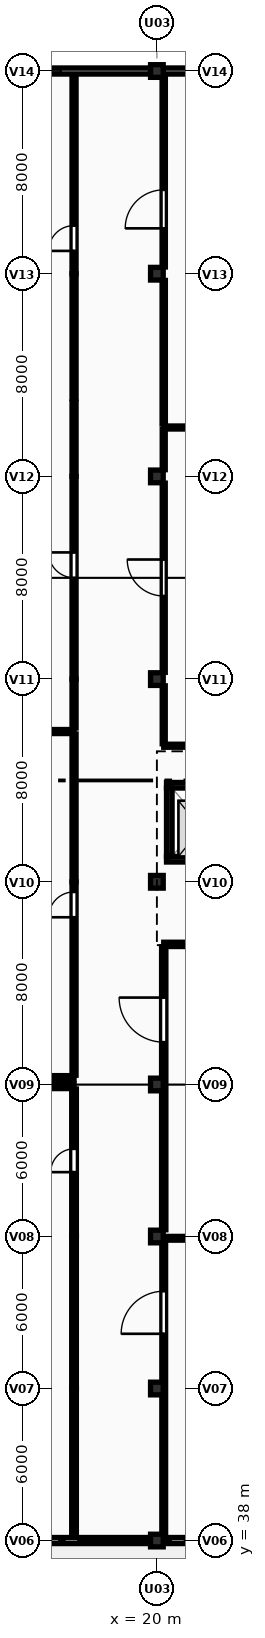
"""IFC4 building model, lengths in metres.
Left out: names, types, materials, properties, quantities, classifications, styles, units other than length and angle.
Written with IfcOpenShell. Run it as: python <this file> out.ifc"""

import sys

from ifc_helpers import new_model, si_unit, direction, frame, frame_2d, origin, origin_2d, place, context, subcontext, project, spatial, rectangle, extrude, element, fill, save


model = new_model("IFC4")
c1 = context("Model", 3, precision=1e-05, world=origin(), true_north=direction((0.0, 1.0)))
c2 = subcontext(c1, "Body", "Model", "MODEL_VIEW")
j1 = project(units=[si_unit("LENGTHUNIT", "METRE"), si_unit("PLANEANGLEUNIT", "RADIAN")], contexts=[c1])
p1 = place(None, origin())
s1 = spatial("IfcSite", under=j1, at=p1, CompositionType="ELEMENT")
p2 = place(p1, origin())
s2 = spatial("IfcBuilding", under=s1, at=p2, CompositionType="ELEMENT")
p3 = place(p2, frame((0.0, 0.0, 4.5)))
s3 = spatial("IfcBuildingStorey", under=s2, at=p3, CompositionType="ELEMENT", Elevation=4.5)
for number, where, z_axis, x_axis in (
    (1, (20.0, 38.0, 0.0), (0.0, 0.0, 1.0), (1.0, 0.0, 0.0)),
    (2, (20.0, 44.0, 0.0), (0.0, 0.0, 1.0), (1.0, 0.0, 0.0)),
    (3, (20.0, 50.0, 0.0), (0.0, 0.0, 1.0), (1.0, 0.0, 0.0)),
    (4, (20.0, 56.0, 0.0), (0.0, 0.0, 1.0), (1.0, 0.0, 0.0)),
    (5, (20.0, 64.0, 0.0), (0.0, 0.0, 1.0), (1.0, 0.0, 0.0)),
    (6, (20.0, 72.0, 0.0), (0.0, 0.0, 1.0), (1.0, 0.0, 0.0)),
    (7, (20.0, 80.0, 0.0), (0.0, 0.0, 1.0), (1.0, 0.0, 0.0)),
    (8, (20.0, 88.0, 0.0), (0.0, 0.0, 1.0), (1.0, 0.0, 0.0)),
    (9, (20.0, 96.0, 0.0), (0.0, 0.0, 1.0), (1.0, 0.0, 0.0)),
):
    element("IfcColumn", number, at=place(p3, frame(where, z_axis=z_axis, x_axis=x_axis)), inside=s3, PredefinedType="COLUMN", context=c2, shape_type="SweptSolid", body=[
        extrude(rectangle(XDim=0.5, YDim=0.5, at=origin_2d()), origin(), (0.0, 0.0, 1.0), 3.9),
    ])
p4 = place(p3, frame((12.25, 96.0, 0.0), z_axis=(0.0, 0.0, 1.0), x_axis=(1.0, 0.0, 0.0)))
e10 = element("IfcWall", 10, at=p4, inside=s3, PredefinedType="SOLIDWALL", context=c2, shape_type="SweptSolid", body=[
    extrude(rectangle(XDim=7.5, YDim=0.24, at=frame_2d((3.75, 0.0))), origin(), (0.0, 0.0, 1.0), 3.0),
])
p5 = place(p4, frame((2.65, 0.0, 0.95)))
e11 = element("IfcOpeningElement", 11, at=p5, cuts=e10, PredefinedType="OPENING", context=c2, shape_type="SweptSolid", body=[
    extrude(rectangle(XDim=1.3, YDim=1.4, at=frame_2d((0.65, 0.7))), frame((0.0, 0.13, 0.0), z_axis=(0.0, -1.0, 0.0), x_axis=(1.0, 0.0, 0.0)), (0.0, 0.0, 1.0), 0.26),
])
p6 = place(p3, frame((20.25, 96.0, 0.0), z_axis=(0.0, 0.0, 1.0), x_axis=(1.0, 0.0, 0.0)))
e12 = element("IfcWall", 12, at=p6, inside=s3, PredefinedType="SOLIDWALL", context=c2, shape_type="SweptSolid", body=[
    extrude(rectangle(XDim=7.5, YDim=0.24, at=frame_2d((3.75, 0.0))), origin(), (0.0, 0.0, 1.0), 3.0),
])
p7 = place(p6, frame((2.975, 0.0, 0.95)))
e13 = element("IfcOpeningElement", 13, at=p7, cuts=e12, PredefinedType="OPENING", context=c2, shape_type="SweptSolid", body=[
    extrude(rectangle(XDim=1.55, YDim=1.4, at=frame_2d((0.775, 0.7))), frame((0.0, 0.13, 0.0), z_axis=(0.0, -1.0, 0.0), x_axis=(1.0, 0.0, 0.0)), (0.0, 0.0, 1.0), 0.26),
])
p8 = place(p3, frame((27.75, 38.0, 0.0), z_axis=(0.0, 0.0, 1.0), x_axis=(-1.0, 0.0, 0.0)))
e14 = element("IfcWall", 14, at=p8, inside=s3, PredefinedType="SOLIDWALL", context=c2, shape_type="SweptSolid", body=[
    extrude(rectangle(XDim=7.5, YDim=0.24, at=frame_2d((3.75, 0.0))), origin(), (0.0, 0.0, 1.0), 2.998),
])
p9 = place(p8, frame((2.85, 0.0, 0.95)))
e15 = element("IfcOpeningElement", 15, at=p9, cuts=e14, PredefinedType="OPENING", context=c2, shape_type="SweptSolid", body=[
    extrude(rectangle(XDim=1.8, YDim=1.5, at=frame_2d((0.9, 0.75))), frame((0.0, 0.13, 0.0), z_axis=(0.0, -1.0, 0.0), x_axis=(1.0, 0.0, 0.0)), (0.0, 0.0, 1.0), 0.26),
])
p10 = place(p3, frame((19.75, 38.0, 0.0), z_axis=(0.0, 0.0, 1.0), x_axis=(-1.0, 0.0, 0.0)))
e16 = element("IfcWall", 16, at=p10, inside=s3, PredefinedType="SOLIDWALL", context=c2, shape_type="SweptSolid", body=[
    extrude(rectangle(XDim=7.5, YDim=0.24, at=frame_2d((3.75, 0.0))), origin(), (0.0, 0.0, 1.0), 2.998),
])
p11 = place(p3, frame((23.12, 64.89, 0.0), z_axis=(0.0, 0.0, 1.0), x_axis=(-1.0, 0.0, 0.0)))
e17 = element("IfcWall", 17, at=p11, inside=s3, PredefinedType="SHEAR", context=c2, shape_type="SweptSolid", body=[
    extrude(rectangle(XDim=2.74, YDim=0.22, at=frame_2d((1.37, 0.0))), origin(), (0.0, 0.0, 1.0), 3.65),
])
p12 = place(p11, frame((0.87, 0.0, 0.0)))
e18 = element("IfcOpeningElement", 18, at=p12, cuts=e17, PredefinedType="OPENING", context=c2, shape_type="SweptSolid", body=[
    extrude(rectangle(XDim=1.0, YDim=2.15, at=frame_2d((0.5, 1.075))), frame((0.0, 0.12, 0.0), z_axis=(0.0, -1.0, 0.0), x_axis=(1.0, 0.0, 0.0)), (0.0, 0.0, 1.0), 0.24),
])
p13 = place(p3, frame((20.38, 67.81, 0.0), z_axis=(0.0, 0.0, 1.0), x_axis=(1.0, 0.0, 0.0)))
e19 = element("IfcWall", 19, at=p13, inside=s3, PredefinedType="SHEAR", context=c2, shape_type="SweptSolid", body=[
    extrude(rectangle(XDim=2.74, YDim=0.22, at=frame_2d((1.37, 0.0))), origin(), (0.0, 0.0, 1.0), 3.65),
])
p14 = place(p3, frame((20.49, 65.0, 0.0), z_axis=(0.0, 0.0, 1.0), x_axis=(0.0, 1.0, 0.0)))
e20 = element("IfcWall", 20, at=p14, inside=s3, PredefinedType="SHEAR", context=c2, shape_type="SweptSolid", body=[
    extrude(rectangle(XDim=2.7, YDim=0.22, at=frame_2d((1.35, 0.0))), origin(), (0.0, 0.0, 1.0), 3.65),
])
p15 = place(p3, frame((12.265, 56.27, 0.0), z_axis=(0.0, 0.0, 1.0), x_axis=(1.0, 0.0, 0.0)))
e21 = element("IfcWall", 21, at=p15, inside=s3, PredefinedType="PARTITIONING", context=c2, shape_type="SweptSolid", body=[
    extrude(rectangle(XDim=4.465, YDim=0.16, at=frame_2d((2.232, 0.0))), origin(), (0.0, 0.0, 1.0), 3.0),
])
p16 = place(p3, frame((12.0, 69.93, 0.0), z_axis=(0.0, 0.0, 1.0), x_axis=(1.0, 0.0, 0.0)))
e22 = element("IfcWall", 22, at=p16, inside=s3, PredefinedType="PARTITIONING", context=c2, shape_type="SweptSolid", body=[
    extrude(rectangle(XDim=4.73, YDim=0.16, at=frame_2d((2.365, 0.0))), origin(), (0.0, 0.0, 1.0), 3.65),
])
p17 = place(p3, frame((16.73, 56.365, 0.0), z_axis=(0.0, 0.0, 1.0), x_axis=(0.0, 1.0, 0.0)))
e23 = element("IfcWall", 23, at=p17, inside=s3, PredefinedType="PARTITIONING", context=c2, shape_type="SweptSolid", body=[
    extrude(rectangle(XDim=7.635, YDim=0.16, at=frame_2d((3.817, 0.0))), origin(), (0.0, 0.0, 1.0), 3.65),
])
p18 = place(p17, frame((6.235, 0.0, 0.0)))
e24 = element("IfcOpeningElement", 24, at=p18, cuts=e23, PredefinedType="OPENING", context=c2, shape_type="SweptSolid", body=[
    extrude(rectangle(XDim=1.0, YDim=2.15, at=frame_2d((0.5, 1.075))), frame((0.0, 0.09, 0.0), z_axis=(0.0, -1.0, 0.0), x_axis=(1.0, 0.0, 0.0)), (0.0, 0.0, 1.0), 0.18),
])
p19 = place(p3, frame((16.73, 64.0, 0.0), z_axis=(0.0, 0.0, 1.0), x_axis=(0.0, 1.0, 0.0)))
e25 = element("IfcWall", 25, at=p19, inside=s3, PredefinedType="PARTITIONING", context=c2, shape_type="SweptSolid", body=[
    extrude(rectangle(XDim=5.835, YDim=0.16, at=frame_2d((2.917, 0.0))), origin(), (0.0, 0.0, 1.0), 3.65),
])
p20 = place(p3, frame((16.73, 70.07, 0.0), z_axis=(0.0, 0.0, 1.0), x_axis=(0.0, 1.0, 0.0)))
e26 = element("IfcWall", 26, at=p20, inside=s3, PredefinedType="PARTITIONING", context=c2, shape_type="SweptSolid", body=[
    extrude(rectangle(XDim=1.93, YDim=0.16, at=frame_2d((0.965, 0.0))), origin(), (0.0, 0.0, 1.0), 3.65),
])
p21 = place(p3, frame((16.73, 72.0, 0.0), z_axis=(0.0, 0.0, 1.0), x_axis=(0.0, 1.0, 0.0)))
e27 = element("IfcWall", 27, at=p21, inside=s3, PredefinedType="PARTITIONING", context=c2, shape_type="SweptSolid", body=[
    extrude(rectangle(XDim=8.0, YDim=0.16, at=frame_2d((4.0, 0.0))), origin(), (0.0, 0.0, 1.0), 3.65),
])
p22 = place(p21, frame((4.0, 0.0, 0.0)))
e28 = element("IfcOpeningElement", 28, at=p22, cuts=e27, PredefinedType="OPENING", context=c2, shape_type="SweptSolid", body=[
    extrude(rectangle(XDim=1.0, YDim=2.15, at=frame_2d((0.5, 1.075))), frame((0.0, 0.09, 0.0), z_axis=(0.0, -1.0, 0.0), x_axis=(1.0, 0.0, 0.0)), (0.0, 0.0, 1.0), 0.18),
])
p23 = place(p3, frame((16.73, 80.0, 0.0), z_axis=(0.0, 0.0, 1.0), x_axis=(0.0, 1.0, 0.0)))
e29 = element("IfcWall", 29, at=p23, inside=s3, PredefinedType="PARTITIONING", context=c2, shape_type="SweptSolid", body=[
    extrude(rectangle(XDim=2.93, YDim=0.16, at=frame_2d((1.465, 0.0))), origin(), (0.0, 0.0, 1.0), 3.65),
])
p24 = place(p3, frame((16.73, 83.07, 0.0), z_axis=(0.0, 0.0, 1.0), x_axis=(0.0, 1.0, 0.0)))
e30 = element("IfcWall", 30, at=p24, inside=s3, PredefinedType="PARTITIONING", context=c2, shape_type="SweptSolid", body=[
    extrude(rectangle(XDim=4.93, YDim=0.16, at=frame_2d((2.465, 0.0))), origin(), (0.0, 0.0, 1.0), 3.65),
])
p25 = place(p3, frame((16.73, 88.0, 0.0), z_axis=(0.0, 0.0, 1.0), x_axis=(0.0, 1.0, 0.0)))
e31 = element("IfcWall", 31, at=p25, inside=s3, PredefinedType="PARTITIONING", context=c2, shape_type="SweptSolid", body=[
    extrude(rectangle(XDim=7.838, YDim=0.16, at=frame_2d((3.919, 0.0))), origin(), (0.0, 0.0, 1.0), 3.65),
])
p26 = place(p25, frame((0.9, 0.0, 0.0)))
e32 = element("IfcOpeningElement", 32, at=p26, cuts=e31, PredefinedType="OPENING", context=c2, shape_type="SweptSolid", body=[
    extrude(rectangle(XDim=1.0, YDim=2.15, at=frame_2d((0.5, 1.075))), frame((0.0, 0.09, 0.0), z_axis=(0.0, -1.0, 0.0), x_axis=(1.0, 0.0, 0.0)), (0.0, 0.0, 1.0), 0.18),
])
for number, where, z_axis, x_axis in (
    (33, (20.27, 69.37, 0.0), (0.0, 0.0, 1.0), (1.0, 0.0, 0.0)),
    (34, (20.27, 81.93, 0.0), (0.0, 0.0, 1.0), (1.0, 0.0, 0.0)),
):
    element("IfcWall", number, at=place(p3, frame(where, z_axis=z_axis, x_axis=x_axis)), inside=s3, PredefinedType="PARTITIONING", context=c2, shape_type="SweptSolid", body=[
        extrude(rectangle(XDim=7.73, YDim=0.12, at=frame_2d((3.865, 0.0))), origin(), (0.0, 0.0, 1.0), 3.65),
    ])
p27 = place(p3, frame((20.27, 69.445, 0.0), z_axis=(0.0, 0.0, 1.0), x_axis=(0.0, 1.0, 0.0)))
e35 = element("IfcWall", 35, at=p27, inside=s3, PredefinedType="PARTITIONING", context=c2, shape_type="SweptSolid", body=[
    extrude(rectangle(XDim=2.29, YDim=0.12, at=frame_2d((1.145, 0.0))), origin(), (0.0, 0.0, 1.0), 3.0),
])
p28 = place(p3, frame((20.27, 72.265, 0.0), z_axis=(0.0, 0.0, 1.0), x_axis=(0.0, 1.0, 0.0)))
e36 = element("IfcWall", 36, at=p28, inside=s3, PredefinedType="PARTITIONING", context=c2, shape_type="SweptSolid", body=[
    extrude(rectangle(XDim=7.47, YDim=0.12, at=frame_2d((3.735, 0.0))), origin(), (0.0, 0.0, 1.0), 3.0),
])
p29 = place(p28, frame((3.015, 0.0, 0.0)))
e37 = element("IfcOpeningElement", 37, at=p29, cuts=e36, PredefinedType="OPENING", context=c2, shape_type="SweptSolid", body=[
    extrude(rectangle(XDim=1.44, YDim=2.15, at=frame_2d((0.72, 1.075))), frame((0.0, 0.07, 0.0), z_axis=(0.0, -1.0, 0.0), x_axis=(1.0, 0.0, 0.0)), (0.0, 0.0, 1.0), 0.14),
])
p30 = place(p3, frame((20.27, 80.265, 0.0), z_axis=(0.0, 0.0, 1.0), x_axis=(0.0, 1.0, 0.0)))
e38 = element("IfcWall", 38, at=p30, inside=s3, PredefinedType="PARTITIONING", context=c2, shape_type="SweptSolid", body=[
    extrude(rectangle(XDim=1.59, YDim=0.12, at=frame_2d((0.795, 0.0))), origin(), (0.0, 0.0, 1.0), 3.0),
])
p31 = place(p3, frame((20.27, 82.07, 0.0), z_axis=(0.0, 0.0, 1.0), x_axis=(0.0, 1.0, 0.0)))
e39 = element("IfcWall", 39, at=p31, inside=s3, PredefinedType="PARTITIONING", context=c2, shape_type="SweptSolid", body=[
    extrude(rectangle(XDim=5.665, YDim=0.13, at=frame_2d((2.833, 0.0))), origin(), (0.0, 0.0, 1.0), 3.0),
])
p32 = place(p3, frame((20.27, 88.265, 0.0), z_axis=(0.0, 0.0, 1.0), x_axis=(0.0, 1.0, 0.0)))
e40 = element("IfcWall", 40, at=p32, inside=s3, PredefinedType="PARTITIONING", context=c2, shape_type="SweptSolid", body=[
    extrude(rectangle(XDim=7.47, YDim=0.13, at=frame_2d((3.735, 0.0))), origin(), (0.0, 0.0, 1.0), 3.0),
])
p33 = place(p32, frame((1.525, 0.0, 0.0)))
e41 = element("IfcOpeningElement", 41, at=p33, cuts=e40, PredefinedType="OPENING", context=c2, shape_type="SweptSolid", body=[
    extrude(rectangle(XDim=1.52, YDim=2.2, at=frame_2d((0.76, 1.1))), frame((0.0, 0.075, 0.0), z_axis=(0.0, -1.0, 0.0), x_axis=(1.0, 0.0, 0.0)), (0.0, 0.0, 1.0), 0.15),
])
p34 = place(p3, frame((20.27, 49.93, 0.0), z_axis=(0.0, 0.0, 1.0), x_axis=(1.0, 0.0, 0.0)))
e42 = element("IfcWall", 42, at=p34, inside=s3, PredefinedType="PARTITIONING", context=c2, shape_type="SweptSolid", body=[
    extrude(rectangle(XDim=7.465, YDim=0.15, at=frame_2d((3.732, 0.0))), origin(), (0.0, 0.0, 1.0), 3.0),
])
p35 = place(p3, frame((20.27, 38.265, 0.0), z_axis=(0.0, 0.0, 1.0), x_axis=(0.0, 1.0, 0.0)))
e43 = element("IfcWall", 43, at=p35, inside=s3, PredefinedType="PARTITIONING", context=c2, shape_type="SweptSolid", body=[
    extrude(rectangle(XDim=11.47, YDim=0.15, at=frame_2d((5.735, 0.0))), origin(), (0.0, 0.0, 1.0), 2.998),
])
p36 = place(p35, frame((7.895, 0.0, 0.0)))
e44 = element("IfcOpeningElement", 44, at=p36, cuts=e43, PredefinedType="OPENING", context=c2, shape_type="SweptSolid", body=[
    extrude(rectangle(XDim=1.68, YDim=2.2, at=frame_2d((0.84, 1.1))), frame((0.0, 0.085, 0.0), z_axis=(0.0, -1.0, 0.0), x_axis=(1.0, 0.0, 0.0)), (0.0, 0.0, 1.0), 0.17),
])
p37 = place(p3, frame((20.27, 61.53, 0.0), z_axis=(0.0, 0.0, 1.0), x_axis=(1.0, 0.0, 0.0)))
e45 = element("IfcWall", 45, at=p37, inside=s3, PredefinedType="PARTITIONING", context=c2, shape_type="SweptSolid", body=[
    extrude(rectangle(XDim=7.73, YDim=0.17, at=frame_2d((3.865, 0.0))), origin(), (0.0, 0.0, 1.0), 3.65),
])
p38 = place(p3, frame((20.27, 50.265, 0.0), z_axis=(0.0, 0.0, 1.0), x_axis=(0.0, 1.0, 0.0)))
e46 = element("IfcWall", 46, at=p38, inside=s3, PredefinedType="PARTITIONING", context=c2, shape_type="SweptSolid", body=[
    extrude(rectangle(XDim=11.165, YDim=0.17, at=frame_2d((5.583, 0.0))), origin(), (0.0, 0.0, 1.0), 3.0),
])
p39 = place(p38, frame((7.405, 0.0, 0.0)))
e47 = element("IfcOpeningElement", 47, at=p39, cuts=e46, PredefinedType="OPENING", context=c2, shape_type="SweptSolid", body=[
    extrude(rectangle(XDim=1.76, YDim=2.2, at=frame_2d((0.88, 1.1))), frame((0.0, 0.095, 0.0), z_axis=(0.0, -1.0, 0.0), x_axis=(1.0, 0.0, 0.0)), (0.0, 0.0, 1.0), 0.19),
])
p40 = place(p3, frame((11.005, 55.93, 0.0), z_axis=(0.0, 0.0, 1.0), x_axis=(1.0, 0.0, 0.0)))
e48 = element("IfcWall", 48, at=p40, inside=s3, PredefinedType="PARTITIONING", context=c2, shape_type="SweptSolid", body=[
    extrude(rectangle(XDim=5.725, YDim=0.185, at=frame_2d((2.863, 0.0))), origin(), (0.0, 0.0, 1.0), 3.0),
])
p41 = place(p3, frame((16.73, 38.162, 0.0), z_axis=(0.0, 0.0, 1.0), x_axis=(0.0, 1.0, 0.0)))
e49 = element("IfcWall", 49, at=p41, inside=s3, PredefinedType="PARTITIONING", context=c2, shape_type="SweptSolid", body=[
    extrude(rectangle(XDim=5.838, YDim=0.185, at=frame_2d((2.919, 0.0))), origin(), (0.0, 0.0, 1.0), 3.65),
])
p42 = place(p3, frame((16.73, 44.0, 0.0), z_axis=(0.0, 0.0, 1.0), x_axis=(0.0, 1.0, 0.0)))
e50 = element("IfcWall", 50, at=p42, inside=s3, PredefinedType="PARTITIONING", context=c2, shape_type="SweptSolid", body=[
    extrude(rectangle(XDim=6.0, YDim=0.185, at=frame_2d((3.0, 0.0))), origin(), (0.0, 0.0, 1.0), 3.65),
])
p43 = place(p3, frame((16.73, 50.0, 0.0), z_axis=(0.0, 0.0, 1.0), x_axis=(0.0, 1.0, 0.0)))
e51 = element("IfcWall", 51, at=p43, inside=s3, PredefinedType="PARTITIONING", context=c2, shape_type="SweptSolid", body=[
    extrude(rectangle(XDim=5.823, YDim=0.185, at=frame_2d((2.911, 0.0))), origin(), (0.0, 0.0, 1.0), 3.65),
])
p44 = place(p43, frame((2.54, 0.0, 0.0)))
e52 = element("IfcOpeningElement", 52, at=p44, cuts=e51, PredefinedType="OPENING", context=c2, shape_type="SweptSolid", body=[
    extrude(rectangle(XDim=0.92, YDim=2.2, at=frame_2d((0.46, 1.1))), frame((0.0, 0.103, 0.0), z_axis=(0.0, -1.0, 0.0), x_axis=(1.0, 0.0, 0.0)), (0.0, 0.0, 1.0), 0.205),
])
p45 = place(p5, origin())
e53 = element("IfcWindow", 53, at=p45, inside=s3, PartitioningType="SINGLE_PANEL", PredefinedType="WINDOW", context=c2, shape_type="SweptSolid", body=[
    extrude(rectangle(XDim=1.3, YDim=1.4, at=frame_2d((0.65, 0.7))), frame((0.0, 0.03, 0.0), z_axis=(0.0, -1.0, 0.0), x_axis=(1.0, 0.0, 0.0)), (0.0, 0.0, 1.0), 0.06),
])
fill(e11, e53)
p46 = place(p18, origin())
e54 = element("IfcDoor", 54, at=p46, inside=s3, OperationType="SINGLE_SWING_LEFT", PredefinedType="DOOR", context=c2, shape_type="SweptSolid", body=[
    extrude(rectangle(XDim=1.0, YDim=2.15, at=frame_2d((0.5, 1.075))), frame((0.0, 0.025, 0.0), z_axis=(0.0, -1.0, 0.0), x_axis=(1.0, 0.0, 0.0)), (0.0, 0.0, 1.0), 0.05),
])
fill(e24, e54)
p47 = place(p22, origin())
e55 = element("IfcDoor", 55, at=p47, inside=s3, OperationType="SINGLE_SWING_RIGHT", PredefinedType="DOOR", context=c2, shape_type="SweptSolid", body=[
    extrude(rectangle(XDim=1.0, YDim=2.15, at=frame_2d((0.5, 1.075))), frame((0.0, 0.025, 0.0), z_axis=(0.0, -1.0, 0.0), x_axis=(1.0, 0.0, 0.0)), (0.0, 0.0, 1.0), 0.05),
])
fill(e28, e55)
p48 = place(p26, origin())
e56 = element("IfcDoor", 56, at=p48, inside=s3, OperationType="SINGLE_SWING_LEFT", PredefinedType="DOOR", context=c2, shape_type="SweptSolid", body=[
    extrude(rectangle(XDim=1.0, YDim=2.15, at=frame_2d((0.5, 1.075))), frame((0.0, 0.025, 0.0), z_axis=(0.0, -1.0, 0.0), x_axis=(1.0, 0.0, 0.0)), (0.0, 0.0, 1.0), 0.05),
])
fill(e32, e56)
p49 = place(p29, origin())
e57 = element("IfcDoor", 57, at=p49, inside=s3, OperationType="SINGLE_SWING_RIGHT", PredefinedType="DOOR", context=c2, shape_type="SweptSolid", body=[
    extrude(rectangle(XDim=1.44, YDim=2.15, at=frame_2d((0.72, 1.075))), frame((0.0, 0.025, 0.0), z_axis=(0.0, -1.0, 0.0), x_axis=(1.0, 0.0, 0.0)), (0.0, 0.0, 1.0), 0.05),
])
fill(e37, e57)
p50 = place(p33, origin())
e58 = element("IfcDoor", 58, at=p50, inside=s3, OperationType="SINGLE_SWING_LEFT", PredefinedType="DOOR", context=c2, shape_type="SweptSolid", body=[
    extrude(rectangle(XDim=1.52, YDim=2.2, at=frame_2d((0.76, 1.1))), frame((0.0, 0.025, 0.0), z_axis=(0.0, -1.0, 0.0), x_axis=(1.0, 0.0, 0.0)), (0.0, 0.0, 1.0), 0.05),
])
fill(e41, e58)
p51 = place(p36, origin())
e59 = element("IfcDoor", 59, at=p51, inside=s3, OperationType="SINGLE_SWING_LEFT", PredefinedType="DOOR", context=c2, shape_type="SweptSolid", body=[
    extrude(rectangle(XDim=1.68, YDim=2.2, at=frame_2d((0.84, 1.1))), frame((0.0, 0.025, 0.0), z_axis=(0.0, -1.0, 0.0), x_axis=(1.0, 0.0, 0.0)), (0.0, 0.0, 1.0), 0.05),
])
fill(e44, e59)
p52 = place(p39, origin())
e60 = element("IfcDoor", 60, at=p52, inside=s3, OperationType="SINGLE_SWING_RIGHT", PredefinedType="DOOR", context=c2, shape_type="SweptSolid", body=[
    extrude(rectangle(XDim=1.76, YDim=2.2, at=frame_2d((0.88, 1.1))), frame((0.0, 0.025, 0.0), z_axis=(0.0, -1.0, 0.0), x_axis=(1.0, 0.0, 0.0)), (0.0, 0.0, 1.0), 0.05),
])
fill(e47, e60)
p53 = place(p44, origin())
e61 = element("IfcDoor", 61, at=p53, inside=s3, OperationType="SINGLE_SWING_LEFT", PredefinedType="DOOR", context=c2, shape_type="SweptSolid", body=[
    extrude(rectangle(XDim=0.92, YDim=2.2, at=frame_2d((0.46, 1.1))), frame((0.0, 0.025, 0.0), z_axis=(0.0, -1.0, 0.0), x_axis=(1.0, 0.0, 0.0)), (0.0, 0.0, 1.0), 0.05),
])
fill(e52, e61)
save(model, sys.argv[1])
